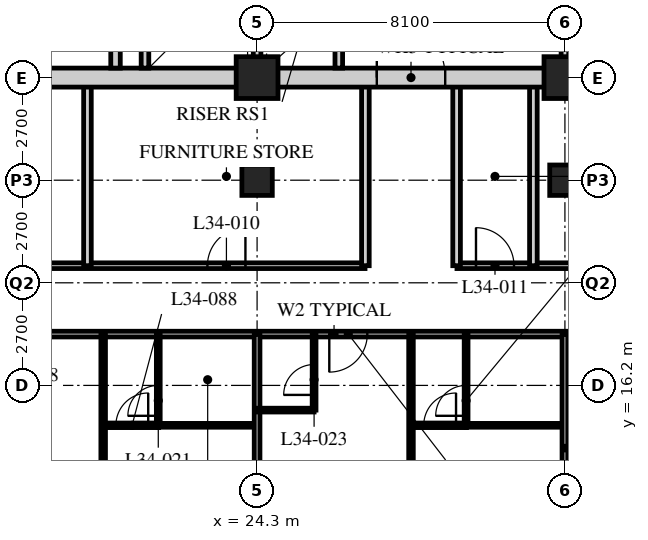
"""IFC4 building model, lengths in metres.
Left out: names, types, materials, properties, quantities, classifications, styles, units other than length and angle.
Written with IfcOpenShell. Run it as: python <this file> out.ifc"""

import sys

from ifc_helpers import new_model, si_unit, direction, frame, frame_2d, origin, origin_2d, place, context, subcontext, project, spatial, rectangle, hollow_rectangle, extrude, element, fill, save


model = new_model("IFC4")
c1 = context("Model", 3, precision=1e-05, world=origin(), true_north=direction((0.0, 1.0)))
c2 = subcontext(c1, "Body", "Model", "MODEL_VIEW")
j1 = project(units=[si_unit("LENGTHUNIT", "METRE"), si_unit("PLANEANGLEUNIT", "RADIAN")], contexts=[c1])
p1 = place(None, origin())
s1 = spatial("IfcSite", under=j1, at=p1, CompositionType="ELEMENT")
p2 = place(p1, origin())
s2 = spatial("IfcBuilding", under=s1, at=p2, CompositionType="ELEMENT")
p3 = place(p2, frame((0.0, 0.0, 134.0)))
s3 = spatial("IfcBuildingStorey", under=s2, at=p3, CompositionType="ELEMENT", Elevation=134.0)
p4 = place(p3, frame((24.3, 21.6, 0.0), z_axis=(0.0, 0.0, 1.0), x_axis=(1.0, 0.0, 0.0)))
e1 = element("IfcColumn", 1, at=p4, inside=s3, PredefinedType="COLUMN", context=c2, shape_type="SweptSolid", body=[
    extrude(hollow_rectangle(XDim=0.8, YDim=0.8, WallThickness=0.08, at=origin_2d()), origin(), (0.0, 0.0, 1.0), 3.4),
])
p5 = place(p3, frame((24.3, 24.3, 0.0), z_axis=(0.0, 0.0, 1.0), x_axis=(1.0, 0.0, 0.0)))
e2 = element("IfcColumn", 2, at=p5, inside=s3, PredefinedType="COLUMN", context=c2, shape_type="SweptSolid", body=[
    extrude(hollow_rectangle(XDim=1.1, YDim=1.1, WallThickness=0.1, at=origin_2d()), origin(), (0.0, 0.0, 1.0), 3.4),
])
p6 = place(p3, frame((32.4, 21.6, 0.0), z_axis=(0.0, 0.0, 1.0), x_axis=(1.0, 0.0, 0.0)))
e3 = element("IfcColumn", 3, at=p6, inside=s3, PredefinedType="COLUMN", context=c2, shape_type="SweptSolid", body=[
    extrude(hollow_rectangle(XDim=0.8, YDim=0.8, WallThickness=0.08, at=origin_2d()), origin(), (0.0, 0.0, 1.0), 3.4),
])
p7 = place(p3, frame((32.4, 24.3, 0.0), z_axis=(0.0, 0.0, 1.0), x_axis=(1.0, 0.0, 0.0)))
e4 = element("IfcColumn", 4, at=p7, inside=s3, PredefinedType="COLUMN", context=c2, shape_type="SweptSolid", body=[
    extrude(hollow_rectangle(XDim=1.1, YDim=1.1, WallThickness=0.1, at=origin_2d()), origin(), (0.0, 0.0, 1.0), 3.4),
])
p8 = place(p3, frame((8.1, 17.55, 0.0), z_axis=(0.0, 0.0, 1.0), x_axis=(1.0, 0.0, 0.0)))
e5 = element("IfcWall", 5, at=p8, inside=s3, PredefinedType="PARTITIONING", context=c2, shape_type="SweptSolid", body=[
    extrude(rectangle(XDim=36.45, YDim=0.15, at=frame_2d((18.225, 0.0))), origin(), (0.0, 0.0, 1.0), 3.19),
])
p9 = place(p8, frame((9.625, 0.0, 0.0)))
e6 = element("IfcOpeningElement", 6, at=p9, cuts=e5, PredefinedType="OPENING", context=c2, shape_type="SweptSolid", body=[
    extrude(rectangle(XDim=1.0, YDim=2.1, at=frame_2d((0.5, 1.05))), frame((0.0, 0.085, 0.0), z_axis=(0.0, -1.0, 0.0), x_axis=(1.0, 0.0, 0.0)), (0.0, 0.0, 1.0), 0.17),
])
p10 = place(p8, frame((18.1, 0.0, 0.0)))
e7 = element("IfcOpeningElement", 7, at=p10, cuts=e5, PredefinedType="OPENING", context=c2, shape_type="SweptSolid", body=[
    extrude(rectangle(XDim=1.0, YDim=2.1, at=frame_2d((0.5, 1.05))), frame((0.0, 0.085, 0.0), z_axis=(0.0, -1.0, 0.0), x_axis=(1.0, 0.0, 0.0)), (0.0, 0.0, 1.0), 0.17),
])
p11 = place(p8, frame((26.75, 0.0, 0.0)))
e8 = element("IfcOpeningElement", 8, at=p11, cuts=e5, PredefinedType="OPENING", context=c2, shape_type="SweptSolid", body=[
    extrude(rectangle(XDim=1.0, YDim=2.1, at=frame_2d((0.5, 1.05))), frame((0.0, 0.085, 0.0), z_axis=(0.0, -1.0, 0.0), x_axis=(1.0, 0.0, 0.0)), (0.0, 0.0, 1.0), 0.17),
])
p12 = place(p8, frame((30.8, 0.0, 0.0)))
e9 = element("IfcOpeningElement", 9, at=p12, cuts=e5, PredefinedType="OPENING", context=c2, shape_type="SweptSolid", body=[
    extrude(rectangle(XDim=1.0, YDim=2.1, at=frame_2d((0.5, 1.05))), frame((0.0, 0.085, 0.0), z_axis=(0.0, -1.0, 0.0), x_axis=(1.0, 0.0, 0.0)), (0.0, 0.0, 1.0), 0.17),
])
p13 = place(p8, frame((1.525, 0.0, 0.0)))
e10 = element("IfcOpeningElement", 10, at=p13, cuts=e5, PredefinedType="OPENING", context=c2, shape_type="SweptSolid", body=[
    extrude(rectangle(XDim=1.0, YDim=2.1, at=frame_2d((0.5, 1.05))), frame((0.0, 0.085, 0.0), z_axis=(0.0, -1.0, 0.0), x_axis=(1.0, 0.0, 0.0)), (0.0, 0.0, 1.0), 0.17),
])
p14 = place(p8, frame((33.925, 0.0, 0.0)))
e11 = element("IfcOpeningElement", 11, at=p14, cuts=e5, PredefinedType="OPENING", context=c2, shape_type="SweptSolid", body=[
    extrude(rectangle(XDim=1.0, YDim=2.1, at=frame_2d((0.5, 1.05))), frame((0.0, 0.085, 0.0), z_axis=(0.0, -1.0, 0.0), x_axis=(1.0, 0.0, 0.0)), (0.0, 0.0, 1.0), 0.17),
])
p15 = place(p3, frame((9.9, 19.35, 0.0), z_axis=(0.0, 0.0, 1.0), x_axis=(1.0, 0.0, 0.0)))
e12 = element("IfcWall", 12, at=p15, inside=s3, PredefinedType="PARTITIONING", context=c2, shape_type="SweptSolid", body=[
    extrude(rectangle(XDim=17.24, YDim=0.15, at=frame_2d((8.62, 0.0))), origin(), (0.0, 0.0, 1.0), 3.19),
])
p16 = place(p15, frame((0.51, 0.0, 0.0)))
e13 = element("IfcOpeningElement", 13, at=p16, cuts=e12, PredefinedType="OPENING", context=c2, shape_type="SweptSolid", body=[
    extrude(rectangle(XDim=1.0, YDim=2.1, at=frame_2d((0.5, 1.05))), frame((0.0, 0.085, 0.0), z_axis=(0.0, -1.0, 0.0), x_axis=(1.0, 0.0, 0.0)), (0.0, 0.0, 1.0), 0.17),
])
p17 = place(p15, frame((3.66, 0.0, 0.0)))
e14 = element("IfcOpeningElement", 14, at=p17, cuts=e12, PredefinedType="OPENING", context=c2, shape_type="SweptSolid", body=[
    extrude(rectangle(XDim=1.0, YDim=2.1, at=frame_2d((0.5, 1.05))), frame((0.0, 0.085, 0.0), z_axis=(0.0, -1.0, 0.0), x_axis=(1.0, 0.0, 0.0)), (0.0, 0.0, 1.0), 0.17),
])
p18 = place(p15, frame((7.618, 0.0, 0.0)))
e15 = element("IfcOpeningElement", 15, at=p18, cuts=e12, PredefinedType="OPENING", context=c2, shape_type="SweptSolid", body=[
    extrude(rectangle(XDim=1.0, YDim=2.1, at=frame_2d((0.5, 1.05))), frame((0.0, 0.085, 0.0), z_axis=(0.0, -1.0, 0.0), x_axis=(1.0, 0.0, 0.0)), (0.0, 0.0, 1.0), 0.17),
])
p19 = place(p15, frame((13.093, 0.0, 0.0)))
e16 = element("IfcOpeningElement", 16, at=p19, cuts=e12, PredefinedType="OPENING", context=c2, shape_type="SweptSolid", body=[
    extrude(rectangle(XDim=1.0, YDim=2.1, at=frame_2d((0.5, 1.05))), frame((0.0, 0.085, 0.0), z_axis=(0.0, -1.0, 0.0), x_axis=(1.0, 0.0, 0.0)), (0.0, 0.0, 1.0), 0.17),
])
p20 = place(p3, frame((29.56, 19.35, 0.0), z_axis=(0.0, 0.0, 1.0), x_axis=(1.0, 0.0, 0.0)))
e17 = element("IfcWall", 17, at=p20, inside=s3, PredefinedType="PARTITIONING", context=c2, shape_type="SweptSolid", body=[
    extrude(rectangle(XDim=13.19, YDim=0.15, at=frame_2d((6.595, 0.0))), origin(), (0.0, 0.0, 1.0), 3.19),
])
p21 = place(p20, frame((0.5, 0.0, 0.0)))
e18 = element("IfcOpeningElement", 18, at=p21, cuts=e17, PredefinedType="OPENING", context=c2, shape_type="SweptSolid", body=[
    extrude(rectangle(XDim=1.0, YDim=2.1, at=frame_2d((0.5, 1.05))), frame((0.0, 0.085, 0.0), z_axis=(0.0, -1.0, 0.0), x_axis=(1.0, 0.0, 0.0)), (0.0, 0.0, 1.0), 0.17),
])
p22 = place(p20, frame((7.1, 0.0, 0.0)))
e19 = element("IfcOpeningElement", 19, at=p22, cuts=e17, PredefinedType="OPENING", context=c2, shape_type="SweptSolid", body=[
    extrude(rectangle(XDim=1.0, YDim=2.1, at=frame_2d((0.5, 1.05))), frame((0.0, 0.085, 0.0), z_axis=(0.0, -1.0, 0.0), x_axis=(1.0, 0.0, 0.0)), (0.0, 0.0, 1.0), 0.17),
])
for number, where, z_axis, x_axis in (
    (20, (19.836, 19.35, 0.0), (0.0, 0.0, 1.0), (0.0, 1.0, 0.0)),
    (21, (31.57, 19.35, 0.0), (0.0, 0.0, 1.0), (0.0, 1.0, 0.0)),
    (22, (27.15, 19.35, 0.0), (0.0, 0.0, 1.0), (0.0, 1.0, 0.0)),
    (23, (29.55, 19.35, 0.0), (0.0, 0.0, 1.0), (0.0, 1.0, 0.0)),
):
    element("IfcWall", number, at=place(p3, frame(where, z_axis=z_axis, x_axis=x_axis)), inside=s3, PredefinedType="SOLIDWALL", context=c2, shape_type="SweptSolid", body=[
        extrude(rectangle(XDim=4.95, YDim=0.2, at=frame_2d((2.475, 0.0))), origin(), (0.0, 0.0, 1.0), 3.19),
    ])
p23 = place(p3, frame((21.7, 15.15, 0.0), z_axis=(0.0, 0.0, 1.0), x_axis=(1.0, 0.0, 0.0)))
e24 = element("IfcWall", 24, at=p23, inside=s3, PredefinedType="PARTITIONING", context=c2, shape_type="SweptSolid", body=[
    extrude(rectangle(XDim=2.6, YDim=0.1, at=frame_2d((1.3, 0.0))), origin(), (0.0, 0.0, 1.0), 3.19),
])
p24 = place(p3, frame((21.7, 17.55, 0.0), z_axis=(0.0, 0.0, 1.0), x_axis=(0.0, -1.0, 0.0)))
e25 = element("IfcWall", 25, at=p24, inside=s3, PredefinedType="PARTITIONING", context=c2, shape_type="SweptSolid", body=[
    extrude(rectangle(XDim=2.4, YDim=0.1, at=frame_2d((1.2, 0.0))), origin(), (0.0, 0.0, 1.0), 3.19),
])
p25 = place(p24, frame((1.35, 0.0, 0.0)))
e26 = element("IfcOpeningElement", 26, at=p25, cuts=e25, PredefinedType="OPENING", context=c2, shape_type="SweptSolid", body=[
    extrude(rectangle(XDim=0.8, YDim=2.1, at=frame_2d((0.4, 1.05))), frame((0.0, 0.06, 0.0), z_axis=(0.0, -1.0, 0.0), x_axis=(1.0, 0.0, 0.0)), (0.0, 0.0, 1.0), 0.12),
])
p26 = place(p3, frame((20.25, 17.55, 0.0), z_axis=(0.0, 0.0, 1.0), x_axis=(0.0, -1.0, 0.0)))
e27 = element("IfcWall", 27, at=p26, inside=s3, PredefinedType="PARTITIONING", context=c2, shape_type="SweptSolid", body=[
    extrude(rectangle(XDim=11.85, YDim=0.12, at=frame_2d((5.925, 0.0))), origin(), (0.0, 0.0, 1.0), 3.19),
])
p27 = place(p26, frame((6.85, 0.0, 0.0)))
e28 = element("IfcOpeningElement", 28, at=p27, cuts=e27, PredefinedType="OPENING", context=c2, shape_type="SweptSolid", body=[
    extrude(rectangle(XDim=0.85, YDim=2.1, at=frame_2d((0.425, 1.05))), frame((0.0, 0.07, 0.0), z_axis=(0.0, -1.0, 0.0), x_axis=(1.0, 0.0, 0.0)), (0.0, 0.0, 1.0), 0.14),
])
p28 = place(p3, frame((24.3, 17.55, 0.0), z_axis=(0.0, 0.0, 1.0), x_axis=(0.0, -1.0, 0.0)))
e29 = element("IfcWall", 29, at=p28, inside=s3, PredefinedType="PARTITIONING", context=c2, shape_type="SweptSolid", body=[
    extrude(rectangle(XDim=11.85, YDim=0.15, at=frame_2d((5.925, 0.0))), origin(), (0.0, 0.0, 1.0), 2.578),
])
p29 = place(p3, frame((24.3, 15.55, 0.0), z_axis=(0.0, 0.0, 1.0), x_axis=(1.0, 0.0, 0.0)))
e30 = element("IfcWall", 30, at=p29, inside=s3, PredefinedType="PARTITIONING", context=c2, shape_type="SweptSolid", body=[
    extrude(rectangle(XDim=1.5, YDim=0.1, at=frame_2d((0.75, 0.0))), origin(), (0.0, 0.0, 1.0), 3.19),
])
p30 = place(p3, frame((25.8, 17.55, 0.0), z_axis=(0.0, 0.0, 1.0), x_axis=(0.0, -1.0, 0.0)))
e31 = element("IfcWall", 31, at=p30, inside=s3, PredefinedType="PARTITIONING", context=c2, shape_type="SweptSolid", body=[
    extrude(rectangle(XDim=2.0, YDim=0.1, at=frame_2d((1.0, 0.0))), origin(), (0.0, 0.0, 1.0), 3.19),
])
p31 = place(p30, frame((0.8, 0.0, 0.0)))
e32 = element("IfcOpeningElement", 32, at=p31, cuts=e31, PredefinedType="OPENING", context=c2, shape_type="SweptSolid", body=[
    extrude(rectangle(XDim=0.8, YDim=2.1, at=frame_2d((0.4, 1.05))), frame((0.0, 0.06, 0.0), z_axis=(0.0, -1.0, 0.0), x_axis=(1.0, 0.0, 0.0)), (0.0, 0.0, 1.0), 0.12),
])
p32 = place(p3, frame((29.8, 15.15, 0.0), z_axis=(0.0, 0.0, 1.0), x_axis=(1.0, 0.0, 0.0)))
e33 = element("IfcWall", 33, at=p32, inside=s3, PredefinedType="PARTITIONING", context=c2, shape_type="SweptSolid", body=[
    extrude(rectangle(XDim=2.6, YDim=0.1, at=frame_2d((1.3, 0.0))), origin(), (0.0, 0.0, 1.0), 3.19),
])
p33 = place(p3, frame((29.8, 17.55, 0.0), z_axis=(0.0, 0.0, 1.0), x_axis=(0.0, -1.0, 0.0)))
e34 = element("IfcWall", 34, at=p33, inside=s3, PredefinedType="PARTITIONING", context=c2, shape_type="SweptSolid", body=[
    extrude(rectangle(XDim=2.4, YDim=0.1, at=frame_2d((1.2, 0.0))), origin(), (0.0, 0.0, 1.0), 3.19),
])
p34 = place(p33, frame((1.35, 0.0, 0.0)))
e35 = element("IfcOpeningElement", 35, at=p34, cuts=e34, PredefinedType="OPENING", context=c2, shape_type="SweptSolid", body=[
    extrude(rectangle(XDim=0.8, YDim=2.1, at=frame_2d((0.4, 1.05))), frame((0.0, 0.06, 0.0), z_axis=(0.0, -1.0, 0.0), x_axis=(1.0, 0.0, 0.0)), (0.0, 0.0, 1.0), 0.12),
])
p35 = place(p3, frame((28.35, 17.55, 0.0), z_axis=(0.0, 0.0, 1.0), x_axis=(0.0, -1.0, 0.0)))
e36 = element("IfcWall", 36, at=p35, inside=s3, PredefinedType="PARTITIONING", context=c2, shape_type="SweptSolid", body=[
    extrude(rectangle(XDim=11.85, YDim=0.12, at=frame_2d((5.925, 0.0))), origin(), (0.0, 0.0, 1.0), 3.19),
])
p36 = place(p35, frame((6.85, 0.0, 0.0)))
e37 = element("IfcOpeningElement", 37, at=p36, cuts=e36, PredefinedType="OPENING", context=c2, shape_type="SweptSolid", body=[
    extrude(rectangle(XDim=0.85, YDim=2.1, at=frame_2d((0.425, 1.05))), frame((0.0, 0.07, 0.0), z_axis=(0.0, -1.0, 0.0), x_axis=(1.0, 0.0, 0.0)), (0.0, 0.0, 1.0), 0.14),
])
p37 = place(p3, frame((32.4, 17.55, 0.0), z_axis=(0.0, 0.0, 1.0), x_axis=(0.0, -1.0, 0.0)))
e38 = element("IfcWall", 38, at=p37, inside=s3, PredefinedType="PARTITIONING", context=c2, shape_type="SweptSolid", body=[
    extrude(rectangle(XDim=11.85, YDim=0.15, at=frame_2d((5.925, 0.0))), origin(), (0.0, 0.0, 1.0), 2.578),
])
p38 = place(p3, frame((32.4, 14.55, 0.0), z_axis=(0.0, 0.0, 1.0), x_axis=(1.0, 0.0, 0.0)))
e39 = element("IfcWall", 39, at=p38, inside=s3, PredefinedType="PARTITIONING", context=c2, shape_type="SweptSolid", body=[
    extrude(rectangle(XDim=2.3, YDim=0.1, at=frame_2d((1.15, 0.0))), origin(), (0.0, 0.0, 1.0), 3.19),
])
p39 = place(p3, frame((21.71, 15.15, 0.0), z_axis=(0.0, 0.0, 1.0), x_axis=(-1.0, 0.0, 0.0)))
e40 = element("IfcWall", 40, at=p39, inside=s3, PredefinedType="PARTITIONING", context=c2, shape_type="SweptSolid", body=[
    extrude(rectangle(XDim=1.46, YDim=0.12, at=frame_2d((0.73, 0.0))), origin(), (0.0, 0.0, 1.0), 3.19),
])
p40 = place(p39, frame((0.275, 0.0, 0.0)))
e41 = element("IfcOpeningElement", 41, at=p40, cuts=e40, PredefinedType="OPENING", context=c2, shape_type="SweptSolid", body=[
    extrude(rectangle(XDim=0.85, YDim=2.1, at=frame_2d((0.425, 1.05))), frame((0.0, 0.07, 0.0), z_axis=(0.0, -1.0, 0.0), x_axis=(1.0, 0.0, 0.0)), (0.0, 0.0, 1.0), 0.14),
])
p41 = place(p3, frame((29.81, 15.15, 0.0), z_axis=(0.0, 0.0, 1.0), x_axis=(-1.0, 0.0, 0.0)))
e42 = element("IfcWall", 42, at=p41, inside=s3, PredefinedType="PARTITIONING", context=c2, shape_type="SweptSolid", body=[
    extrude(rectangle(XDim=1.46, YDim=0.12, at=frame_2d((0.73, 0.0))), origin(), (0.0, 0.0, 1.0), 3.19),
])
p42 = place(p41, frame((0.275, 0.0, 0.0)))
e43 = element("IfcOpeningElement", 43, at=p42, cuts=e42, PredefinedType="OPENING", context=c2, shape_type="SweptSolid", body=[
    extrude(rectangle(XDim=0.85, YDim=2.1, at=frame_2d((0.425, 1.05))), frame((0.0, 0.07, 0.0), z_axis=(0.0, -1.0, 0.0), x_axis=(1.0, 0.0, 0.0)), (0.0, 0.0, 1.0), 0.14),
])
p43 = place(p3, frame((15.95, 24.3, 0.0), z_axis=(0.0, 0.0, 1.0), x_axis=(1.0, 0.0, 0.0)))
e44 = element("IfcWall", 44, at=p43, inside=s3, PredefinedType="SOLIDWALL", context=c2, shape_type="SweptSolid", body=[
    extrude(rectangle(XDim=24.8, YDim=0.5, at=frame_2d((12.4, 0.0))), origin(), (0.0, 0.0, 1.0), 2.54),
])
p44 = place(p43, frame((11.5, 0.0, 0.0)))
e45 = element("IfcOpeningElement", 45, at=p44, cuts=e44, PredefinedType="OPENING", context=c2, shape_type="SweptSolid", body=[
    extrude(rectangle(XDim=1.8, YDim=2.4, at=frame_2d((0.9, 1.2))), frame((0.0, 0.26, 0.0), z_axis=(0.0, -1.0, 0.0), x_axis=(1.0, 0.0, 0.0)), (0.0, 0.0, 1.0), 0.52),
])
p45 = place(p3, frame((24.3, 24.55, 0.0), z_axis=(0.0, 0.0, 1.0), x_axis=(0.0, 1.0, 0.0)))
e46 = element("IfcWall", 46, at=p45, inside=s3, PredefinedType="SOLIDWALL", context=c2, shape_type="SweptSolid", body=[
    extrude(rectangle(XDim=7.75, YDim=0.2, at=frame_2d((3.875, 0.0))), origin(), (0.0, 0.0, 1.0), 2.578),
])
p46 = place(p45, frame((4.6, 0.0, 0.0)))
e47 = element("IfcOpeningElement", 47, at=p46, cuts=e46, PredefinedType="OPENING", context=c2, shape_type="SweptSolid", body=[
    extrude(rectangle(XDim=1.2, YDim=2.1, at=frame_2d((0.6, 1.05))), frame((0.0, 0.11, 0.0), z_axis=(0.0, -1.0, 0.0), x_axis=(1.0, 0.0, 0.0)), (0.0, 0.0, 1.0), 0.22),
])
p47 = place(p3, frame((20.575, 24.55, 0.0), z_axis=(0.0, 0.0, 1.0), x_axis=(0.0, 1.0, 0.0)))
e48 = element("IfcWall", 48, at=p47, inside=s3, PredefinedType="SOLIDWALL", context=c2, shape_type="SweptSolid", body=[
    extrude(rectangle(XDim=7.75, YDim=0.25, at=frame_2d((3.875, 0.0))), origin(), (0.0, 0.0, 1.0), 3.19),
])
p48 = place(p47, frame((6.2, 0.0, 0.0)))
e49 = element("IfcOpeningElement", 49, at=p48, cuts=e48, PredefinedType="OPENING", context=c2, shape_type="SweptSolid", body=[
    extrude(rectangle(XDim=1.2, YDim=2.1, at=frame_2d((0.6, 1.05))), frame((0.0, 0.135, 0.0), z_axis=(0.0, -1.0, 0.0), x_axis=(1.0, 0.0, 0.0)), (0.0, 0.0, 1.0), 0.27),
])
p49 = place(p3, frame((21.35, 24.55, 0.0), z_axis=(0.0, 0.0, 1.0), x_axis=(0.0, 1.0, 0.0)))
e50 = element("IfcWall", 50, at=p49, inside=s3, PredefinedType="SOLIDWALL", context=c2, shape_type="SweptSolid", body=[
    extrude(rectangle(XDim=2.6, YDim=0.2, at=frame_2d((1.3, 0.0))), origin(), (0.0, 0.0, 1.0), 3.19),
])
p50 = place(p3, frame((26.45, 24.55, 0.0), z_axis=(0.0, 0.0, 1.0), x_axis=(0.0, 1.0, 0.0)))
e51 = element("IfcWall", 51, at=p50, inside=s3, PredefinedType="SOLIDWALL", context=c2, shape_type="SweptSolid", body=[
    extrude(rectangle(XDim=1.6, YDim=0.2, at=frame_2d((0.8, 0.0))), origin(), (0.0, 0.0, 1.0), 3.19),
])
p51 = place(p3, frame((32.4, 24.55, 0.0), z_axis=(0.0, 0.0, 1.0), x_axis=(0.0, 1.0, 0.0)))
e52 = element("IfcWall", 52, at=p51, inside=s3, PredefinedType="PARTITIONING", context=c2, shape_type="SweptSolid", body=[
    extrude(rectangle(XDim=7.75, YDim=0.2, at=frame_2d((3.875, 0.0))), origin(), (0.0, 0.0, 1.0), 2.578),
])
p52 = place(p51, frame((1.4, 0.0, 0.0)))
e53 = element("IfcOpeningElement", 53, at=p52, cuts=e52, PredefinedType="OPENING", context=c2, shape_type="SweptSolid", body=[
    extrude(rectangle(XDim=0.9, YDim=2.1, at=frame_2d((0.45, 1.05))), frame((0.0, 0.11, 0.0), z_axis=(0.0, -1.0, 0.0), x_axis=(1.0, 0.0, 0.0)), (0.0, 0.0, 1.0), 0.22),
])
p53 = place(p51, frame((5.35, 0.0, 0.0)))
e54 = element("IfcOpeningElement", 54, at=p53, cuts=e52, PredefinedType="OPENING", context=c2, shape_type="SweptSolid", body=[
    extrude(rectangle(XDim=0.9, YDim=2.1, at=frame_2d((0.45, 1.05))), frame((0.0, 0.11, 0.0), z_axis=(0.0, -1.0, 0.0), x_axis=(1.0, 0.0, 0.0)), (0.0, 0.0, 1.0), 0.22),
])
p54 = place(p19, origin())
e55 = element("IfcDoor", 55, at=p54, inside=s3, OperationType="SINGLE_SWING_RIGHT", PredefinedType="DOOR", context=c2, shape_type="SweptSolid", body=[
    extrude(rectangle(XDim=1.0, YDim=2.1, at=frame_2d((0.5, 1.05))), frame((0.0, 0.025, 0.0), z_axis=(0.0, -1.0, 0.0), x_axis=(1.0, 0.0, 0.0)), (0.0, 0.0, 1.0), 0.05),
])
fill(e16, e55)
p55 = place(p21, origin())
e56 = element("IfcDoor", 56, at=p55, inside=s3, OperationType="SINGLE_SWING_LEFT", PredefinedType="DOOR", context=c2, shape_type="SweptSolid", body=[
    extrude(rectangle(XDim=1.0, YDim=2.1, at=frame_2d((0.5, 1.05))), frame((0.0, 0.025, 0.0), z_axis=(0.0, -1.0, 0.0), x_axis=(1.0, 0.0, 0.0)), (0.0, 0.0, 1.0), 0.05),
])
fill(e18, e56)
p56 = place(p25, origin())
e57 = element("IfcDoor", 57, at=p56, inside=s3, OperationType="SINGLE_SWING_LEFT", PredefinedType="DOOR", context=c2, shape_type="SweptSolid", body=[
    extrude(rectangle(XDim=0.8, YDim=2.1, at=frame_2d((0.4, 1.05))), frame((0.0, 0.025, 0.0), z_axis=(0.0, -1.0, 0.0), x_axis=(1.0, 0.0, 0.0)), (0.0, 0.0, 1.0), 0.05),
])
fill(e26, e57)
p57 = place(p31, origin())
e58 = element("IfcDoor", 58, at=p57, inside=s3, OperationType="SINGLE_SWING_LEFT", PredefinedType="DOOR", context=c2, shape_type="SweptSolid", body=[
    extrude(rectangle(XDim=0.8, YDim=2.1, at=frame_2d((0.4, 1.05))), frame((0.0, 0.025, 0.0), z_axis=(0.0, -1.0, 0.0), x_axis=(1.0, 0.0, 0.0)), (0.0, 0.0, 1.0), 0.05),
])
fill(e32, e58)
p58 = place(p10, origin())
e59 = element("IfcDoor", 59, at=p58, inside=s3, OperationType="SINGLE_SWING_RIGHT", PredefinedType="DOOR", context=c2, shape_type="SweptSolid", body=[
    extrude(rectangle(XDim=1.0, YDim=2.1, at=frame_2d((0.5, 1.05))), frame((0.0, 0.025, 0.0), z_axis=(0.0, -1.0, 0.0), x_axis=(1.0, 0.0, 0.0)), (0.0, 0.0, 1.0), 0.05),
])
fill(e7, e59)
p59 = place(p34, origin())
e60 = element("IfcDoor", 60, at=p59, inside=s3, OperationType="SINGLE_SWING_LEFT", PredefinedType="DOOR", context=c2, shape_type="SweptSolid", body=[
    extrude(rectangle(XDim=0.8, YDim=2.1, at=frame_2d((0.4, 1.05))), frame((0.0, 0.025, 0.0), z_axis=(0.0, -1.0, 0.0), x_axis=(1.0, 0.0, 0.0)), (0.0, 0.0, 1.0), 0.05),
])
fill(e35, e60)
p60 = place(p40, origin())
e61 = element("IfcDoor", 61, at=p60, inside=s3, OperationType="SINGLE_SWING_RIGHT", PredefinedType="DOOR", context=c2, shape_type="SweptSolid", body=[
    extrude(rectangle(XDim=0.85, YDim=2.1, at=frame_2d((0.425, 1.05))), frame((0.0, 0.025, 0.0), z_axis=(0.0, -1.0, 0.0), x_axis=(1.0, 0.0, 0.0)), (0.0, 0.0, 1.0), 0.05),
])
fill(e41, e61)
p61 = place(p42, origin())
e62 = element("IfcDoor", 62, at=p61, inside=s3, OperationType="SINGLE_SWING_RIGHT", PredefinedType="DOOR", context=c2, shape_type="SweptSolid", body=[
    extrude(rectangle(XDim=0.85, YDim=2.1, at=frame_2d((0.425, 1.05))), frame((0.0, 0.025, 0.0), z_axis=(0.0, -1.0, 0.0), x_axis=(1.0, 0.0, 0.0)), (0.0, 0.0, 1.0), 0.05),
])
fill(e43, e62)
p62 = place(p44, origin())
e63 = element("IfcDoor", 63, at=p62, inside=s3, OperationType="DOUBLE_DOOR_SINGLE_SWING", PredefinedType="DOOR", context=c2, shape_type="SweptSolid", body=[
    extrude(rectangle(XDim=1.8, YDim=2.4, at=frame_2d((0.9, 1.2))), frame((0.0, 0.025, 0.0), z_axis=(0.0, -1.0, 0.0), x_axis=(1.0, 0.0, 0.0)), (0.0, 0.0, 1.0), 0.05),
])
fill(e45, e63)
save(model, sys.argv[1])
